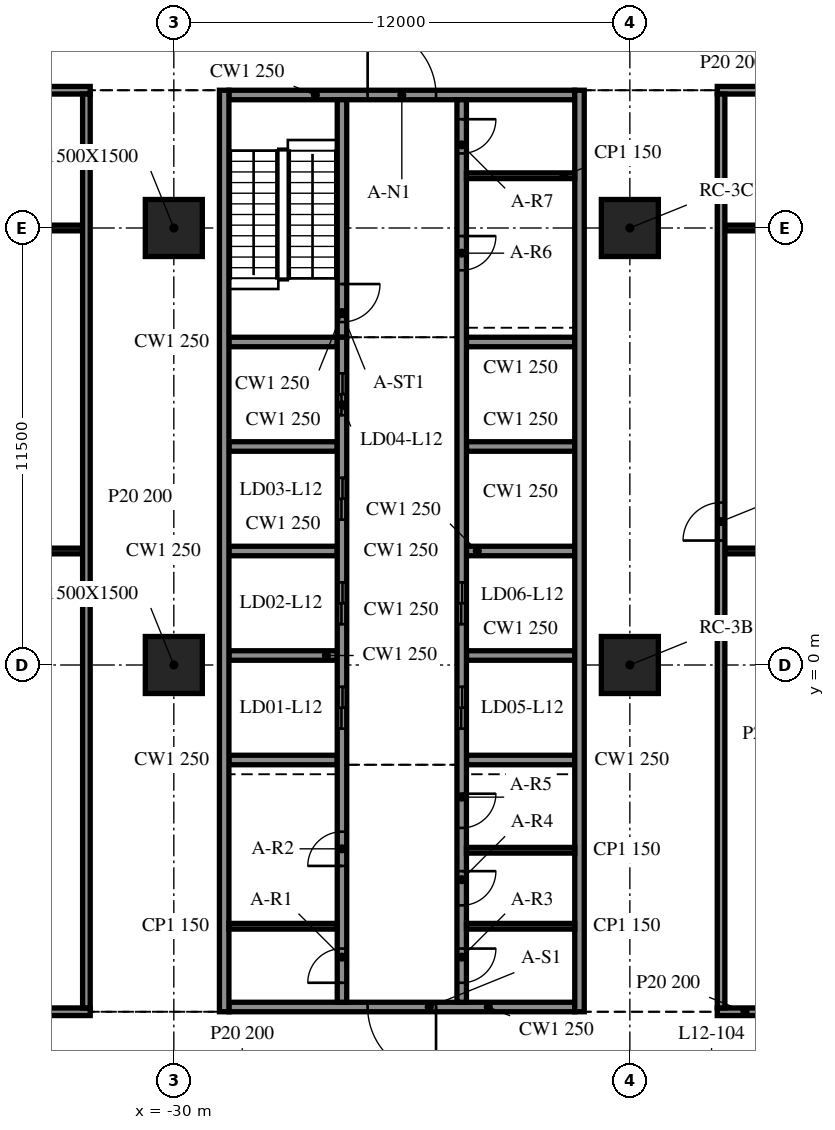
"""IFC4 building model, lengths in metres.
Left out: names, types, materials, properties, quantities, classifications, styles, units other than length and angle.
Written with IfcOpenShell. Run it as: python <this file> out.ifc"""

import sys

from ifc_helpers import new_model, si_unit, direction, frame, frame_2d, origin, origin_2d, place, context, subcontext, project, spatial, rectangle, extrude, element, fill, save


model = new_model("IFC4")
c1 = context("Model", 3, precision=1e-05, world=origin(), true_north=direction((0.0, 1.0)))
c2 = subcontext(c1, "Body", "Model", "MODEL_VIEW")
j1 = project(units=[si_unit("LENGTHUNIT", "METRE"), si_unit("PLANEANGLEUNIT", "RADIAN")], contexts=[c1])
p1 = place(None, origin())
s1 = spatial("IfcSite", under=j1, at=p1, CompositionType="ELEMENT")
p2 = place(p1, origin())
s2 = spatial("IfcBuilding", under=s1, at=p2, CompositionType="ELEMENT")
p3 = place(p2, frame((0.0, 0.0, 54.6)))
s3 = spatial("IfcBuildingStorey", under=s2, at=p3, CompositionType="ELEMENT", Elevation=54.6)
for number, where, z_axis, x_axis in (
    (1, (-30.0, 0.0, -0.34), (0.0, 0.0, 1.0), (1.0, 0.0, 0.0)),
    (2, (-30.0, 11.5, -0.34), (0.0, 0.0, 1.0), (1.0, 0.0, 0.0)),
    (3, (-18.0, 0.0, -0.34), (0.0, 0.0, 1.0), (1.0, 0.0, 0.0)),
    (4, (-18.0, 11.5, -0.34), (0.0, 0.0, 1.0), (1.0, 0.0, 0.0)),
):
    element("IfcColumn", number, at=place(p3, frame(where, z_axis=z_axis, x_axis=x_axis)), inside=s3, PredefinedType="COLUMN", context=c2, shape_type="SweptSolid", body=[
        extrude(rectangle(XDim=1.5, YDim=1.5, at=origin_2d()), origin(), (0.0, 0.0, 1.0), 4.3),
    ])
for number, where, z_axis, x_axis in (
    (5, (-28.675, 15.125, 0.0), (0.0, 0.0, 1.0), (0.0, -1.0, 0.0)),
    (6, (-19.325, -9.125, 0.0), (0.0, 0.0, 1.0), (0.0, 1.0, 0.0)),
):
    element("IfcWall", number, at=place(p3, frame(where, z_axis=z_axis, x_axis=x_axis)), inside=s3, PredefinedType="SOLIDWALL", context=c2, shape_type="SweptSolid", body=[
        extrude(rectangle(XDim=24.25, YDim=0.25, at=frame_2d((12.125, 0.0))), origin(), (0.0, 0.0, 1.0), 3.96),
    ])
p4 = place(p3, frame((-19.45, -9.0, 0.0), z_axis=(0.0, 0.0, 1.0), x_axis=(-1.0, 0.0, 0.0)))
e7 = element("IfcWall", 7, at=p4, inside=s3, PredefinedType="SOLIDWALL", context=c2, shape_type="SweptSolid", body=[
    extrude(rectangle(XDim=9.1, YDim=0.25, at=frame_2d((4.55, 0.0))), origin(), (0.0, 0.0, 1.0), 3.96),
])
p5 = place(p4, frame((3.65, 0.0, 0.0)))
e8 = element("IfcOpeningElement", 8, at=p5, cuts=e7, PredefinedType="OPENING", context=c2, shape_type="SweptSolid", body=[
    extrude(rectangle(XDim=1.8, YDim=2.1, at=frame_2d((0.9, 1.05))), frame((0.0, 0.135, 0.0), z_axis=(0.0, -1.0, 0.0), x_axis=(1.0, 0.0, 0.0)), (0.0, 0.0, 1.0), 0.27),
])
p6 = place(p3, frame((-28.55, 15.0, 0.0), z_axis=(0.0, 0.0, 1.0), x_axis=(1.0, 0.0, 0.0)))
e9 = element("IfcWall", 9, at=p6, inside=s3, PredefinedType="SOLIDWALL", context=c2, shape_type="SweptSolid", body=[
    extrude(rectangle(XDim=9.1, YDim=0.25, at=frame_2d((4.55, 0.0))), origin(), (0.0, 0.0, 1.0), 3.96),
])
p7 = place(p6, frame((3.65, 0.0, 0.0)))
e10 = element("IfcOpeningElement", 10, at=p7, cuts=e9, PredefinedType="OPENING", context=c2, shape_type="SweptSolid", body=[
    extrude(rectangle(XDim=1.8, YDim=2.1, at=frame_2d((0.9, 1.05))), frame((0.0, 0.135, 0.0), z_axis=(0.0, -1.0, 0.0), x_axis=(1.0, 0.0, 0.0)), (0.0, 0.0, 1.0), 0.27),
])
p8 = place(p3, frame((-25.575, -8.875, 0.0), z_axis=(0.0, 0.0, 1.0), x_axis=(0.0, 1.0, 0.0)))
e11 = element("IfcWall", 11, at=p8, inside=s3, PredefinedType="SOLIDWALL", context=c2, shape_type="SweptSolid", body=[
    extrude(rectangle(XDim=17.5, YDim=0.25, at=frame_2d((8.75, 0.0))), origin(), (0.0, 0.0, 1.0), 3.96),
])
p9 = place(p8, frame((7.2, 0.0, 0.0)))
e12 = element("IfcOpeningElement", 12, at=p9, cuts=e11, PredefinedType="OPENING", context=c2, shape_type="SweptSolid", body=[
    extrude(rectangle(XDim=1.1, YDim=2.1, at=frame_2d((0.55, 1.05))), frame((0.0, 0.135, 0.0), z_axis=(0.0, -1.0, 0.0), x_axis=(1.0, 0.0, 0.0)), (0.0, 0.0, 1.0), 0.27),
])
p10 = place(p8, frame((9.95, 0.0, 0.0)))
e13 = element("IfcOpeningElement", 13, at=p10, cuts=e11, PredefinedType="OPENING", context=c2, shape_type="SweptSolid", body=[
    extrude(rectangle(XDim=1.1, YDim=2.1, at=frame_2d((0.55, 1.05))), frame((0.0, 0.135, 0.0), z_axis=(0.0, -1.0, 0.0), x_axis=(1.0, 0.0, 0.0)), (0.0, 0.0, 1.0), 0.27),
])
p11 = place(p8, frame((12.7, 0.0, 0.0)))
e14 = element("IfcOpeningElement", 14, at=p11, cuts=e11, PredefinedType="OPENING", context=c2, shape_type="SweptSolid", body=[
    extrude(rectangle(XDim=1.1, YDim=2.1, at=frame_2d((0.55, 1.05))), frame((0.0, 0.135, 0.0), z_axis=(0.0, -1.0, 0.0), x_axis=(1.0, 0.0, 0.0)), (0.0, 0.0, 1.0), 0.27),
])
p12 = place(p8, frame((15.45, 0.0, 0.0)))
e15 = element("IfcOpeningElement", 15, at=p12, cuts=e11, PredefinedType="OPENING", context=c2, shape_type="SweptSolid", body=[
    extrude(rectangle(XDim=1.1, YDim=2.1, at=frame_2d((0.55, 1.05))), frame((0.0, 0.135, 0.0), z_axis=(0.0, -1.0, 0.0), x_axis=(1.0, 0.0, 0.0)), (0.0, 0.0, 1.0), 0.27),
])
p13 = place(p8, frame((0.512, 0.0, 0.0)))
e16 = element("IfcOpeningElement", 16, at=p13, cuts=e11, PredefinedType="OPENING", context=c2, shape_type="SweptSolid", body=[
    extrude(rectangle(XDim=0.9, YDim=2.1, at=frame_2d((0.45, 1.05))), frame((0.0, 0.135, 0.0), z_axis=(0.0, -1.0, 0.0), x_axis=(1.0, 0.0, 0.0)), (0.0, 0.0, 1.0), 0.27),
])
p14 = place(p8, frame((3.587, 0.0, 0.0)))
e17 = element("IfcOpeningElement", 17, at=p14, cuts=e11, PredefinedType="OPENING", context=c2, shape_type="SweptSolid", body=[
    extrude(rectangle(XDim=0.9, YDim=2.1, at=frame_2d((0.45, 1.05))), frame((0.0, 0.135, 0.0), z_axis=(0.0, -1.0, 0.0), x_axis=(1.0, 0.0, 0.0)), (0.0, 0.0, 1.0), 0.27),
])
p15 = place(p3, frame((-25.575, 14.875, 0.0), z_axis=(0.0, 0.0, 1.0), x_axis=(0.0, -1.0, 0.0)))
e18 = element("IfcWall", 18, at=p15, inside=s3, PredefinedType="SOLIDWALL", context=c2, shape_type="SweptSolid", body=[
    extrude(rectangle(XDim=6.25, YDim=0.25, at=frame_2d((3.125, 0.0))), origin(), (0.0, 0.0, 1.0), 3.96),
])
p16 = place(p15, frame((4.85, 0.0, 0.0)))
e19 = element("IfcOpeningElement", 19, at=p16, cuts=e18, PredefinedType="OPENING", context=c2, shape_type="SweptSolid", body=[
    extrude(rectangle(XDim=1.0, YDim=2.1, at=frame_2d((0.5, 1.05))), frame((0.0, 0.135, 0.0), z_axis=(0.0, -1.0, 0.0), x_axis=(1.0, 0.0, 0.0)), (0.0, 0.0, 1.0), 0.27),
])
p17 = place(p3, frame((-22.425, 14.875, 0.0), z_axis=(0.0, 0.0, 1.0), x_axis=(0.0, -1.0, 0.0)))
e20 = element("IfcWall", 20, at=p17, inside=s3, PredefinedType="SOLIDWALL", context=c2, shape_type="SweptSolid", body=[
    extrude(rectangle(XDim=23.75, YDim=0.25, at=frame_2d((11.875, 0.0))), origin(), (0.0, 0.0, 1.0), 3.96),
])
p18 = place(p17, frame((15.45, 0.0, 0.0)))
e21 = element("IfcOpeningElement", 21, at=p18, cuts=e20, PredefinedType="OPENING", context=c2, shape_type="SweptSolid", body=[
    extrude(rectangle(XDim=1.1, YDim=2.1, at=frame_2d((0.55, 1.05))), frame((0.0, 0.135, 0.0), z_axis=(0.0, -1.0, 0.0), x_axis=(1.0, 0.0, 0.0)), (0.0, 0.0, 1.0), 0.27),
])
p19 = place(p17, frame((12.7, 0.0, 0.0)))
e22 = element("IfcOpeningElement", 22, at=p19, cuts=e20, PredefinedType="OPENING", context=c2, shape_type="SweptSolid", body=[
    extrude(rectangle(XDim=1.1, YDim=2.1, at=frame_2d((0.55, 1.05))), frame((0.0, 0.135, 0.0), z_axis=(0.0, -1.0, 0.0), x_axis=(1.0, 0.0, 0.0)), (0.0, 0.0, 1.0), 0.27),
])
p20 = place(p17, frame((22.337, 0.0, 0.0)))
e23 = element("IfcOpeningElement", 23, at=p20, cuts=e20, PredefinedType="OPENING", context=c2, shape_type="SweptSolid", body=[
    extrude(rectangle(XDim=0.9, YDim=2.1, at=frame_2d((0.45, 1.05))), frame((0.0, 0.135, 0.0), z_axis=(0.0, -1.0, 0.0), x_axis=(1.0, 0.0, 0.0)), (0.0, 0.0, 1.0), 0.27),
])
p21 = place(p17, frame((20.3, 0.0, 0.0)))
e24 = element("IfcOpeningElement", 24, at=p21, cuts=e20, PredefinedType="OPENING", context=c2, shape_type="SweptSolid", body=[
    extrude(rectangle(XDim=0.9, YDim=2.1, at=frame_2d((0.45, 1.05))), frame((0.0, 0.135, 0.0), z_axis=(0.0, -1.0, 0.0), x_axis=(1.0, 0.0, 0.0)), (0.0, 0.0, 1.0), 0.27),
])
p22 = place(p17, frame((18.262, 0.0, 0.0)))
e25 = element("IfcOpeningElement", 25, at=p22, cuts=e20, PredefinedType="OPENING", context=c2, shape_type="SweptSolid", body=[
    extrude(rectangle(XDim=0.9, YDim=2.1, at=frame_2d((0.45, 1.05))), frame((0.0, 0.135, 0.0), z_axis=(0.0, -1.0, 0.0), x_axis=(1.0, 0.0, 0.0)), (0.0, 0.0, 1.0), 0.27),
])
p23 = place(p17, frame((3.587, 0.0, 0.0)))
e26 = element("IfcOpeningElement", 26, at=p23, cuts=e20, PredefinedType="OPENING", context=c2, shape_type="SweptSolid", body=[
    extrude(rectangle(XDim=0.9, YDim=2.1, at=frame_2d((0.45, 1.05))), frame((0.0, 0.135, 0.0), z_axis=(0.0, -1.0, 0.0), x_axis=(1.0, 0.0, 0.0)), (0.0, 0.0, 1.0), 0.27),
])
p24 = place(p17, frame((0.512, 0.0, 0.0)))
e27 = element("IfcOpeningElement", 27, at=p24, cuts=e20, PredefinedType="OPENING", context=c2, shape_type="SweptSolid", body=[
    extrude(rectangle(XDim=0.9, YDim=2.1, at=frame_2d((0.45, 1.05))), frame((0.0, 0.135, 0.0), z_axis=(0.0, -1.0, 0.0), x_axis=(1.0, 0.0, 0.0)), (0.0, 0.0, 1.0), 0.27),
])
for number, where, z_axis, x_axis in (
    (28, (-28.55, -2.5, 0.0), (0.0, 0.0, 1.0), (1.0, 0.0, 0.0)),
    (29, (-28.55, 0.25, 0.0), (0.0, 0.0, 1.0), (1.0, 0.0, 0.0)),
    (30, (-28.55, 3.0, 0.0), (0.0, 0.0, 1.0), (1.0, 0.0, 0.0)),
    (31, (-28.55, 5.75, 0.0), (0.0, 0.0, 1.0), (1.0, 0.0, 0.0)),
    (32, (-28.55, 8.5, 0.0), (0.0, 0.0, 1.0), (1.0, 0.0, 0.0)),
    (33, (-22.3, -2.5, 0.0), (0.0, 0.0, 1.0), (1.0, 0.0, 0.0)),
    (34, (-22.3, 0.25, 0.0), (0.0, 0.0, 1.0), (1.0, 0.0, 0.0)),
    (35, (-22.3, 3.0, 0.0), (0.0, 0.0, 1.0), (1.0, 0.0, 0.0)),
    (36, (-22.3, 5.75, 0.0), (0.0, 0.0, 1.0), (1.0, 0.0, 0.0)),
    (37, (-22.3, 8.5, 0.0), (0.0, 0.0, 1.0), (1.0, 0.0, 0.0)),
):
    element("IfcWall", number, at=place(p3, frame(where, z_axis=z_axis, x_axis=x_axis)), inside=s3, PredefinedType="SOLIDWALL", context=c2, shape_type="SweptSolid", body=[
        extrude(rectangle(XDim=2.85, YDim=0.25, at=frame_2d((1.425, 0.0))), origin(), (0.0, 0.0, 1.0), 3.96),
    ])
for number, where, z_axis, x_axis in (
    (38, (-28.55, -6.875, 0.0), (0.0, 0.0, 1.0), (1.0, 0.0, 0.0)),
    (39, (-22.3, -6.875, 0.0), (0.0, 0.0, 1.0), (1.0, 0.0, 0.0)),
    (40, (-22.3, -4.875, 0.0), (0.0, 0.0, 1.0), (1.0, 0.0, 0.0)),
    (41, (-22.3, 12.875, 0.0), (0.0, 0.0, 1.0), (1.0, 0.0, 0.0)),
):
    element("IfcWall", number, at=place(p3, frame(where, z_axis=z_axis, x_axis=x_axis)), inside=s3, PredefinedType="PARTITIONING", context=c2, shape_type="SweptSolid", body=[
        extrude(rectangle(XDim=2.85, YDim=0.15, at=frame_2d((1.425, 0.0))), origin(), (0.0, 0.0, 1.0), 3.96),
    ])
p25 = place(p3, frame((-39.95, -9.125, 0.0), z_axis=(0.0, 0.0, 1.0), x_axis=(1.0, 0.0, 0.0)))
e42 = element("IfcWall", 42, at=p25, inside=s3, PredefinedType="PARTITIONING", context=c2, shape_type="SweptSolid", body=[
    extrude(rectangle(XDim=7.75, YDim=0.2, at=frame_2d((3.875, 0.0))), origin(), (0.0, 0.0, 1.0), 3.96),
])
p26 = place(p25, frame((3.3, 0.0, 0.0)))
e43 = element("IfcOpeningElement", 43, at=p26, cuts=e42, PredefinedType="OPENING", context=c2, shape_type="SweptSolid", body=[
    extrude(rectangle(XDim=1.2, YDim=2.1, at=frame_2d((0.6, 1.05))), frame((0.0, 0.11, 0.0), z_axis=(0.0, -1.0, 0.0), x_axis=(1.0, 0.0, 0.0)), (0.0, 0.0, 1.0), 0.22),
])
p27 = place(p3, frame((-15.7, -9.125, 0.0), z_axis=(0.0, 0.0, 1.0), x_axis=(1.0, 0.0, 0.0)))
e44 = element("IfcWall", 44, at=p27, inside=s3, PredefinedType="PARTITIONING", context=c2, shape_type="SweptSolid", body=[
    extrude(rectangle(XDim=7.3, YDim=0.2, at=frame_2d((3.65, 0.0))), origin(), (0.0, 0.0, 1.0), 3.96),
])
p28 = place(p27, frame((3.1, 0.0, 0.0)))
e45 = element("IfcOpeningElement", 45, at=p28, cuts=e44, PredefinedType="OPENING", context=c2, shape_type="SweptSolid", body=[
    extrude(rectangle(XDim=1.0, YDim=2.1, at=frame_2d((0.5, 1.05))), frame((0.0, 0.11, 0.0), z_axis=(0.0, -1.0, 0.0), x_axis=(1.0, 0.0, 0.0)), (0.0, 0.0, 1.0), 0.22),
])
p29 = place(p3, frame((-39.75, 3.0, 0.0), z_axis=(0.0, 0.0, 1.0), x_axis=(1.0, 0.0, 0.0)))
e46 = element("IfcWall", 46, at=p29, inside=s3, PredefinedType="PARTITIONING", context=c2, shape_type="SweptSolid", body=[
    extrude(rectangle(XDim=7.35, YDim=0.15, at=frame_2d((3.675, 0.0))), origin(), (0.0, 0.0, 1.0), 3.96),
])
p30 = place(p3, frame((-15.5, 3.0, 0.0), z_axis=(0.0, 0.0, 1.0), x_axis=(1.0, 0.0, 0.0)))
e47 = element("IfcWall", 47, at=p30, inside=s3, PredefinedType="PARTITIONING", context=c2, shape_type="SweptSolid", body=[
    extrude(rectangle(XDim=6.9, YDim=0.15, at=frame_2d((3.45, 0.0))), origin(), (0.0, 0.0, 1.0), 3.96),
])
p31 = place(p3, frame((-39.75, 11.5, 0.0), z_axis=(0.0, 0.0, 1.0), x_axis=(1.0, 0.0, 0.0)))
e48 = element("IfcWall", 48, at=p31, inside=s3, PredefinedType="PARTITIONING", context=c2, shape_type="SweptSolid", body=[
    extrude(rectangle(XDim=7.35, YDim=0.15, at=frame_2d((3.675, 0.0))), origin(), (0.0, 0.0, 1.0), 3.96),
])
p32 = place(p3, frame((-15.5, 11.5, 0.0), z_axis=(0.0, 0.0, 1.0), x_axis=(1.0, 0.0, 0.0)))
e49 = element("IfcWall", 49, at=p32, inside=s3, PredefinedType="PARTITIONING", context=c2, shape_type="SweptSolid", body=[
    extrude(rectangle(XDim=6.9, YDim=0.15, at=frame_2d((3.45, 0.0))), origin(), (0.0, 0.0, 1.0), 3.96),
])
p33 = place(p3, frame((-39.95, 15.125, 0.0), z_axis=(0.0, 0.0, 1.0), x_axis=(1.0, 0.0, 0.0)))
e50 = element("IfcWall", 50, at=p33, inside=s3, PredefinedType="PARTITIONING", context=c2, shape_type="SweptSolid", body=[
    extrude(rectangle(XDim=7.75, YDim=0.2, at=frame_2d((3.875, 0.0))), origin(), (0.0, 0.0, 1.0), 3.96),
])
p34 = place(p33, frame((3.3, 0.0, 0.0)))
e51 = element("IfcOpeningElement", 51, at=p34, cuts=e50, PredefinedType="OPENING", context=c2, shape_type="SweptSolid", body=[
    extrude(rectangle(XDim=1.2, YDim=2.1, at=frame_2d((0.6, 1.05))), frame((0.0, 0.11, 0.0), z_axis=(0.0, -1.0, 0.0), x_axis=(1.0, 0.0, 0.0)), (0.0, 0.0, 1.0), 0.22),
])
p35 = place(p3, frame((-15.7, 15.125, 0.0), z_axis=(0.0, 0.0, 1.0), x_axis=(1.0, 0.0, 0.0)))
e52 = element("IfcWall", 52, at=p35, inside=s3, PredefinedType="PARTITIONING", context=c2, shape_type="SweptSolid", body=[
    extrude(rectangle(XDim=7.3, YDim=0.2, at=frame_2d((3.65, 0.0))), origin(), (0.0, 0.0, 1.0), 3.96),
])
p36 = place(p35, frame((3.1, 0.0, 0.0)))
e53 = element("IfcOpeningElement", 53, at=p36, cuts=e52, PredefinedType="OPENING", context=c2, shape_type="SweptSolid", body=[
    extrude(rectangle(XDim=1.0, YDim=2.1, at=frame_2d((0.5, 1.05))), frame((0.0, 0.11, 0.0), z_axis=(0.0, -1.0, 0.0), x_axis=(1.0, 0.0, 0.0)), (0.0, 0.0, 1.0), 0.22),
])
p37 = place(p3, frame((-32.3, -9.025, 0.0), z_axis=(0.0, 0.0, 1.0), x_axis=(0.0, 1.0, 0.0)))
e54 = element("IfcWall", 54, at=p37, inside=s3, PredefinedType="PARTITIONING", context=c2, shape_type="SweptSolid", body=[
    extrude(rectangle(XDim=24.05, YDim=0.2, at=frame_2d((12.025, 0.0))), origin(), (0.0, 0.0, 1.0), 3.96),
])
p38 = place(p3, frame((-15.6, -9.025, 0.0), z_axis=(0.0, 0.0, 1.0), x_axis=(0.0, 1.0, 0.0)))
e55 = element("IfcWall", 55, at=p38, inside=s3, PredefinedType="PARTITIONING", context=c2, shape_type="SweptSolid", body=[
    extrude(rectangle(XDim=24.05, YDim=0.2, at=frame_2d((12.025, 0.0))), origin(), (0.0, 0.0, 1.0), 3.96),
])
p39 = place(p38, frame((12.3, 0.0, 0.0)))
e56 = element("IfcOpeningElement", 56, at=p39, cuts=e55, PredefinedType="OPENING", context=c2, shape_type="SweptSolid", body=[
    extrude(rectangle(XDim=1.0, YDim=2.1, at=frame_2d((0.5, 1.05))), frame((0.0, 0.11, 0.0), z_axis=(0.0, -1.0, 0.0), x_axis=(1.0, 0.0, 0.0)), (0.0, 0.0, 1.0), 0.22),
])
p40 = place(p5, origin())
e57 = element("IfcDoor", 57, at=p40, inside=s3, OperationType="DOUBLE_DOOR_SINGLE_SWING", PredefinedType="DOOR", context=c2, shape_type="SweptSolid", body=[
    extrude(rectangle(XDim=1.8, YDim=2.1, at=frame_2d((0.9, 1.05))), frame((0.0, 0.025, 0.0), z_axis=(0.0, -1.0, 0.0), x_axis=(1.0, 0.0, 0.0)), (0.0, 0.0, 1.0), 0.05),
])
fill(e8, e57)
p41 = place(p7, origin())
e58 = element("IfcDoor", 58, at=p41, inside=s3, OperationType="DOUBLE_DOOR_SINGLE_SWING", PredefinedType="DOOR", context=c2, shape_type="SweptSolid", body=[
    extrude(rectangle(XDim=1.8, YDim=2.1, at=frame_2d((0.9, 1.05))), frame((0.0, 0.025, 0.0), z_axis=(0.0, -1.0, 0.0), x_axis=(1.0, 0.0, 0.0)), (0.0, 0.0, 1.0), 0.05),
])
fill(e10, e58)
p42 = place(p18, origin())
e59 = element("IfcDoor", 59, at=p42, inside=s3, OperationType="DOUBLE_DOOR_SLIDING", PredefinedType="DOOR", context=c2, shape_type="SweptSolid", body=[
    extrude(rectangle(XDim=1.1, YDim=2.1, at=frame_2d((0.55, 1.05))), frame((0.0, 0.025, 0.0), z_axis=(0.0, -1.0, 0.0), x_axis=(1.0, 0.0, 0.0)), (0.0, 0.0, 1.0), 0.05),
])
fill(e21, e59)
p43 = place(p19, origin())
e60 = element("IfcDoor", 60, at=p43, inside=s3, OperationType="DOUBLE_DOOR_SLIDING", PredefinedType="DOOR", context=c2, shape_type="SweptSolid", body=[
    extrude(rectangle(XDim=1.1, YDim=2.1, at=frame_2d((0.55, 1.05))), frame((0.0, 0.025, 0.0), z_axis=(0.0, -1.0, 0.0), x_axis=(1.0, 0.0, 0.0)), (0.0, 0.0, 1.0), 0.05),
])
fill(e22, e60)
p44 = place(p9, origin())
e61 = element("IfcDoor", 61, at=p44, inside=s3, OperationType="DOUBLE_DOOR_SLIDING", PredefinedType="DOOR", context=c2, shape_type="SweptSolid", body=[
    extrude(rectangle(XDim=1.1, YDim=2.1, at=frame_2d((0.55, 1.05))), frame((0.0, 0.025, 0.0), z_axis=(0.0, -1.0, 0.0), x_axis=(1.0, 0.0, 0.0)), (0.0, 0.0, 1.0), 0.05),
])
fill(e12, e61)
p45 = place(p10, origin())
e62 = element("IfcDoor", 62, at=p45, inside=s3, OperationType="DOUBLE_DOOR_SLIDING", PredefinedType="DOOR", context=c2, shape_type="SweptSolid", body=[
    extrude(rectangle(XDim=1.1, YDim=2.1, at=frame_2d((0.55, 1.05))), frame((0.0, 0.025, 0.0), z_axis=(0.0, -1.0, 0.0), x_axis=(1.0, 0.0, 0.0)), (0.0, 0.0, 1.0), 0.05),
])
fill(e13, e62)
p46 = place(p11, origin())
e63 = element("IfcDoor", 63, at=p46, inside=s3, OperationType="DOUBLE_DOOR_SLIDING", PredefinedType="DOOR", context=c2, shape_type="SweptSolid", body=[
    extrude(rectangle(XDim=1.1, YDim=2.1, at=frame_2d((0.55, 1.05))), frame((0.0, 0.025, 0.0), z_axis=(0.0, -1.0, 0.0), x_axis=(1.0, 0.0, 0.0)), (0.0, 0.0, 1.0), 0.05),
])
fill(e14, e63)
p47 = place(p12, origin())
e64 = element("IfcDoor", 64, at=p47, inside=s3, OperationType="DOUBLE_DOOR_SLIDING", PredefinedType="DOOR", context=c2, shape_type="SweptSolid", body=[
    extrude(rectangle(XDim=1.1, YDim=2.1, at=frame_2d((0.55, 1.05))), frame((0.0, 0.025, 0.0), z_axis=(0.0, -1.0, 0.0), x_axis=(1.0, 0.0, 0.0)), (0.0, 0.0, 1.0), 0.05),
])
fill(e15, e64)
p48 = place(p13, origin())
e65 = element("IfcDoor", 65, at=p48, inside=s3, OperationType="SINGLE_SWING_LEFT", PredefinedType="DOOR", context=c2, shape_type="SweptSolid", body=[
    extrude(rectangle(XDim=0.9, YDim=2.1, at=frame_2d((0.45, 1.05))), frame((0.0, 0.025, 0.0), z_axis=(0.0, -1.0, 0.0), x_axis=(1.0, 0.0, 0.0)), (0.0, 0.0, 1.0), 0.05),
])
fill(e16, e65)
p49 = place(p14, origin())
e66 = element("IfcDoor", 66, at=p49, inside=s3, OperationType="SINGLE_SWING_RIGHT", PredefinedType="DOOR", context=c2, shape_type="SweptSolid", body=[
    extrude(rectangle(XDim=0.9, YDim=2.1, at=frame_2d((0.45, 1.05))), frame((0.0, 0.025, 0.0), z_axis=(0.0, -1.0, 0.0), x_axis=(1.0, 0.0, 0.0)), (0.0, 0.0, 1.0), 0.05),
])
fill(e17, e66)
p50 = place(p20, origin())
e67 = element("IfcDoor", 67, at=p50, inside=s3, OperationType="SINGLE_SWING_LEFT", PredefinedType="DOOR", context=c2, shape_type="SweptSolid", body=[
    extrude(rectangle(XDim=0.9, YDim=2.1, at=frame_2d((0.45, 1.05))), frame((0.0, 0.025, 0.0), z_axis=(0.0, -1.0, 0.0), x_axis=(1.0, 0.0, 0.0)), (0.0, 0.0, 1.0), 0.05),
])
fill(e23, e67)
p51 = place(p21, origin())
e68 = element("IfcDoor", 68, at=p51, inside=s3, OperationType="SINGLE_SWING_RIGHT", PredefinedType="DOOR", context=c2, shape_type="SweptSolid", body=[
    extrude(rectangle(XDim=0.9, YDim=2.1, at=frame_2d((0.45, 1.05))), frame((0.0, 0.025, 0.0), z_axis=(0.0, -1.0, 0.0), x_axis=(1.0, 0.0, 0.0)), (0.0, 0.0, 1.0), 0.05),
])
fill(e24, e68)
p52 = place(p22, origin())
e69 = element("IfcDoor", 69, at=p52, inside=s3, OperationType="SINGLE_SWING_LEFT", PredefinedType="DOOR", context=c2, shape_type="SweptSolid", body=[
    extrude(rectangle(XDim=0.9, YDim=2.1, at=frame_2d((0.45, 1.05))), frame((0.0, 0.025, 0.0), z_axis=(0.0, -1.0, 0.0), x_axis=(1.0, 0.0, 0.0)), (0.0, 0.0, 1.0), 0.05),
])
fill(e25, e69)
p53 = place(p23, origin())
e70 = element("IfcDoor", 70, at=p53, inside=s3, OperationType="SINGLE_SWING_RIGHT", PredefinedType="DOOR", context=c2, shape_type="SweptSolid", body=[
    extrude(rectangle(XDim=0.9, YDim=2.1, at=frame_2d((0.45, 1.05))), frame((0.0, 0.025, 0.0), z_axis=(0.0, -1.0, 0.0), x_axis=(1.0, 0.0, 0.0)), (0.0, 0.0, 1.0), 0.05),
])
fill(e26, e70)
p54 = place(p24, origin())
e71 = element("IfcDoor", 71, at=p54, inside=s3, OperationType="SINGLE_SWING_LEFT", PredefinedType="DOOR", context=c2, shape_type="SweptSolid", body=[
    extrude(rectangle(XDim=0.9, YDim=2.1, at=frame_2d((0.45, 1.05))), frame((0.0, 0.025, 0.0), z_axis=(0.0, -1.0, 0.0), x_axis=(1.0, 0.0, 0.0)), (0.0, 0.0, 1.0), 0.05),
])
fill(e27, e71)
p55 = place(p16, origin())
e72 = element("IfcDoor", 72, at=p55, inside=s3, OperationType="SINGLE_SWING_RIGHT", PredefinedType="DOOR", context=c2, shape_type="SweptSolid", body=[
    extrude(rectangle(XDim=1.0, YDim=2.1, at=frame_2d((0.5, 1.05))), frame((0.0, 0.025, 0.0), z_axis=(0.0, -1.0, 0.0), x_axis=(1.0, 0.0, 0.0)), (0.0, 0.0, 1.0), 0.05),
])
fill(e19, e72)
p56 = place(p39, origin())
e73 = element("IfcDoor", 73, at=p56, inside=s3, OperationType="SINGLE_SWING_LEFT", PredefinedType="DOOR", context=c2, shape_type="SweptSolid", body=[
    extrude(rectangle(XDim=1.0, YDim=2.1, at=frame_2d((0.5, 1.05))), frame((0.0, 0.025, 0.0), z_axis=(0.0, -1.0, 0.0), x_axis=(1.0, 0.0, 0.0)), (0.0, 0.0, 1.0), 0.05),
])
fill(e56, e73)
save(model, sys.argv[1])
